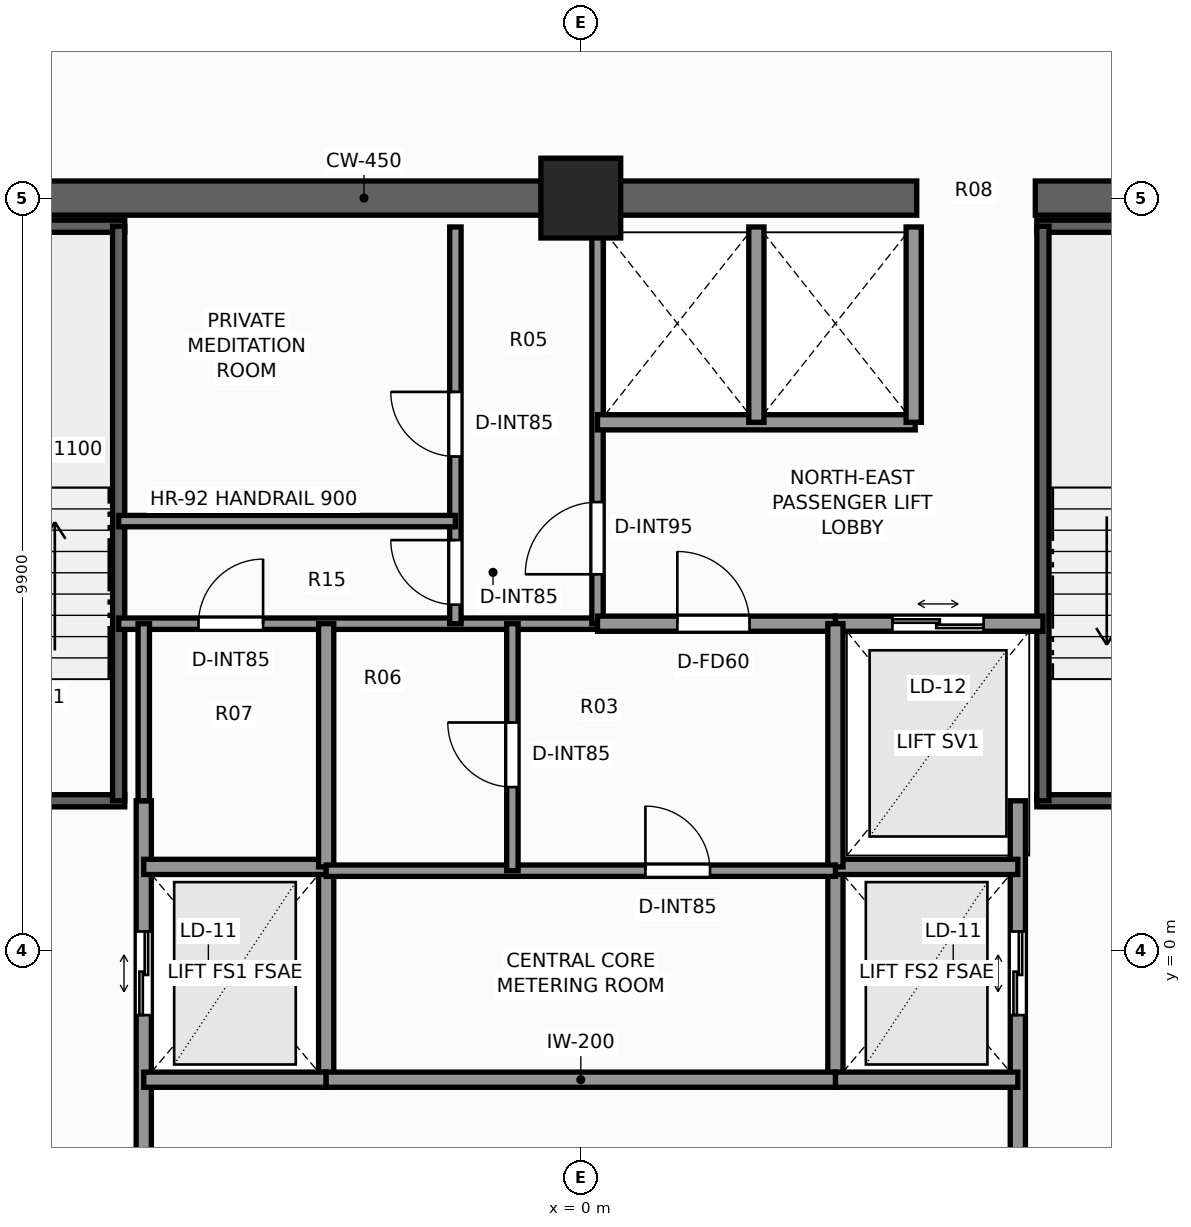
"""IFC4 building model, lengths in metres.
Left out: names, types, materials, properties, quantities, classifications, styles, units other than length and angle.
Written with IfcOpenShell. Run it as: python <this file> out.ifc"""

import sys

from ifc_helpers import new_model, si_unit, direction, frame, frame_2d, origin, origin_2d, place, context, subcontext, project, spatial, rectangle, extrude, element, fill, save


model = new_model("IFC4")
c1 = context("Model", 3, precision=1e-05, world=origin(), true_north=direction((0.0, 1.0)))
c2 = subcontext(c1, "Body", "Model", "MODEL_VIEW")
j1 = project(units=[si_unit("LENGTHUNIT", "METRE"), si_unit("PLANEANGLEUNIT", "RADIAN")], contexts=[c1])
p1 = place(None, origin())
s1 = spatial("IfcSite", under=j1, at=p1, CompositionType="ELEMENT")
p2 = place(p1, origin())
s2 = spatial("IfcBuilding", under=s1, at=p2, CompositionType="ELEMENT")
p3 = place(p2, frame((0.0, 0.0, 209.7)))
s3 = spatial("IfcBuildingStorey", under=s2, at=p3, CompositionType="ELEMENT", Elevation=209.7)
p4 = place(p3, frame((-10.125, 9.9, 0.0), z_axis=(0.0, 0.0, 1.0), x_axis=(1.0, 0.0, 0.0)))
e1 = element("IfcWall", 1, at=p4, inside=s3, PredefinedType="SHEAR", context=c2, shape_type="SweptSolid", body=[
    extrude(rectangle(XDim=14.545, YDim=0.45, at=frame_2d((7.272, 0.0))), origin(), (0.0, 0.0, 1.0), 3.3),
])
p5 = place(p3, frame((5.98, 9.9, 0.0), z_axis=(0.0, 0.0, 1.0), x_axis=(1.0, 0.0, 0.0)))
e2 = element("IfcWall", 2, at=p5, inside=s3, PredefinedType="SHEAR", context=c2, shape_type="SweptSolid", body=[
    extrude(rectangle(XDim=4.145, YDim=0.45, at=frame_2d((2.073, 0.0))), origin(), (0.0, 0.0, 1.0), 3.3),
])
p6 = place(p3, frame((0.0, 9.9, 0.0), z_axis=(0.0, 0.0, 1.0), x_axis=(1.0, 0.0, 0.0)))
e3 = element("IfcColumn", 3, at=p6, inside=s3, PredefinedType="COLUMN", context=c2, shape_type="SweptSolid", body=[
    extrude(rectangle(XDim=1.05, YDim=1.05, at=origin_2d()), origin(), (0.0, 0.0, 1.0), 3.3),
])
p7 = place(p3, frame((-9.52, 1.97, 0.0), z_axis=(0.0, 0.0, 1.0), x_axis=(1.0, 0.0, 0.0)))
e4 = element("IfcWall", 4, at=p7, inside=s3, PredefinedType="SHEAR", context=c2, shape_type="SweptSolid", body=[
    extrude(rectangle(XDim=3.52, YDim=0.16, at=frame_2d((1.76, 0.0))), origin(), (0.0, 0.0, 1.0), 3.3),
])
p8 = place(p7, frame((1.15, 0.0, 0.0)))
e5 = element("IfcOpeningElement", 5, at=p8, cuts=e4, PredefinedType="OPENING", context=c2, shape_type="SweptSolid", body=[
    extrude(rectangle(XDim=1.1, YDim=2.2, at=frame_2d((0.55, 1.1))), frame((0.0, 0.09, 0.0), z_axis=(0.0, -1.0, 0.0), x_axis=(1.0, 0.0, 0.0)), (0.0, 0.0, 1.0), 0.18),
])
p9 = place(p3, frame((-9.52, 9.53, 0.0), z_axis=(0.0, 0.0, 1.0), x_axis=(1.0, 0.0, 0.0)))
e6 = element("IfcWall", 6, at=p9, inside=s3, PredefinedType="SHEAR", context=c2, shape_type="SweptSolid", body=[
    extrude(rectangle(XDim=3.52, YDim=0.16, at=frame_2d((1.76, 0.0))), origin(), (0.0, 0.0, 1.0), 3.3),
])
p10 = place(p3, frame((-6.08, 1.97, 0.0), z_axis=(0.0, 0.0, 1.0), x_axis=(0.0, 1.0, 0.0)))
e7 = element("IfcWall", 7, at=p10, inside=s3, PredefinedType="SHEAR", context=c2, shape_type="SweptSolid", body=[
    extrude(rectangle(XDim=7.56, YDim=0.16, at=frame_2d((3.78, 0.0))), origin(), (0.0, 0.0, 1.0), 3.3),
])
p11 = place(p3, frame((6.0, 1.97, 0.0), z_axis=(0.0, 0.0, 1.0), x_axis=(1.0, 0.0, 0.0)))
e8 = element("IfcWall", 8, at=p11, inside=s3, PredefinedType="SHEAR", context=c2, shape_type="SweptSolid", body=[
    extrude(rectangle(XDim=3.52, YDim=0.16, at=frame_2d((1.76, 0.0))), origin(), (0.0, 0.0, 1.0), 3.3),
])
p12 = place(p11, frame((1.15, 0.0, 0.0)))
e9 = element("IfcOpeningElement", 9, at=p12, cuts=e8, PredefinedType="OPENING", context=c2, shape_type="SweptSolid", body=[
    extrude(rectangle(XDim=1.1, YDim=2.2, at=frame_2d((0.55, 1.1))), frame((0.0, 0.09, 0.0), z_axis=(0.0, -1.0, 0.0), x_axis=(1.0, 0.0, 0.0)), (0.0, 0.0, 1.0), 0.18),
])
p13 = place(p3, frame((6.0, 9.53, 0.0), z_axis=(0.0, 0.0, 1.0), x_axis=(1.0, 0.0, 0.0)))
e10 = element("IfcWall", 10, at=p13, inside=s3, PredefinedType="SHEAR", context=c2, shape_type="SweptSolid", body=[
    extrude(rectangle(XDim=3.52, YDim=0.16, at=frame_2d((1.76, 0.0))), origin(), (0.0, 0.0, 1.0), 3.3),
])
p14 = place(p3, frame((6.08, 1.97, 0.0), z_axis=(0.0, 0.0, 1.0), x_axis=(0.0, 1.0, 0.0)))
e11 = element("IfcWall", 11, at=p14, inside=s3, PredefinedType="SHEAR", context=c2, shape_type="SweptSolid", body=[
    extrude(rectangle(XDim=7.56, YDim=0.16, at=frame_2d((3.78, 0.0))), origin(), (0.0, 0.0, 1.0), 3.3),
])
p15 = place(p3, frame((-5.75, -3.6, 0.0), z_axis=(0.0, 0.0, 1.0), x_axis=(0.0, 1.0, 0.0)))
e12 = element("IfcWall", 12, at=p15, inside=s3, PredefinedType="SOLIDWALL", context=c2, shape_type="SweptSolid", body=[
    extrude(rectangle(XDim=5.57, YDim=0.2, at=frame_2d((2.785, 0.0))), origin(), (0.0, 0.0, 1.0), 3.08),
])
p16 = place(p15, frame((2.75, 0.0, 0.0)))
e13 = element("IfcOpeningElement", 13, at=p16, cuts=e12, PredefinedType="OPENING", context=c2, shape_type="SweptSolid", body=[
    extrude(rectangle(XDim=1.1, YDim=2.2, at=frame_2d((0.55, 1.1))), frame((0.0, 0.11, 0.0), z_axis=(0.0, -1.0, 0.0), x_axis=(1.0, 0.0, 0.0)), (0.0, 0.0, 1.0), 0.22),
])
p17 = place(p3, frame((-3.35, -1.7, 0.0), z_axis=(0.0, 0.0, 1.0), x_axis=(0.0, 1.0, 0.0)))
e14 = element("IfcWall", 14, at=p17, inside=s3, PredefinedType="SOLIDWALL", context=c2, shape_type="SweptSolid", body=[
    extrude(rectangle(XDim=2.8, YDim=0.2, at=frame_2d((1.4, 0.0))), origin(), (0.0, 0.0, 1.0), 3.08),
])
for number, where, z_axis, x_axis in (
    (15, (-5.75, -1.7, 0.0), (0.0, 0.0, 1.0), (1.0, 0.0, 0.0)),
    (16, (-5.75, 1.1, 0.0), (0.0, 0.0, 1.0), (1.0, 0.0, 0.0)),
):
    element("IfcWall", number, at=place(p3, frame(where, z_axis=z_axis, x_axis=x_axis)), inside=s3, PredefinedType="SOLIDWALL", context=c2, shape_type="SweptSolid", body=[
        extrude(rectangle(XDim=2.4, YDim=0.2, at=frame_2d((1.2, 0.0))), origin(), (0.0, 0.0, 1.0), 3.08),
    ])
p18 = place(p3, frame((5.75, -3.6, 0.0), z_axis=(0.0, 0.0, 1.0), x_axis=(0.0, 1.0, 0.0)))
e17 = element("IfcWall", 17, at=p18, inside=s3, PredefinedType="SOLIDWALL", context=c2, shape_type="SweptSolid", body=[
    extrude(rectangle(XDim=5.57, YDim=0.2, at=frame_2d((2.785, 0.0))), origin(), (0.0, 0.0, 1.0), 3.08),
])
p19 = place(p18, frame((2.75, 0.0, 0.0)))
e18 = element("IfcOpeningElement", 18, at=p19, cuts=e17, PredefinedType="OPENING", context=c2, shape_type="SweptSolid", body=[
    extrude(rectangle(XDim=1.1, YDim=2.2, at=frame_2d((0.55, 1.1))), frame((0.0, 0.11, 0.0), z_axis=(0.0, -1.0, 0.0), x_axis=(1.0, 0.0, 0.0)), (0.0, 0.0, 1.0), 0.22),
])
p20 = place(p3, frame((3.35, -1.7, 0.0), z_axis=(0.0, 0.0, 1.0), x_axis=(0.0, 1.0, 0.0)))
e19 = element("IfcWall", 19, at=p20, inside=s3, PredefinedType="SOLIDWALL", context=c2, shape_type="SweptSolid", body=[
    extrude(rectangle(XDim=2.8, YDim=0.2, at=frame_2d((1.4, 0.0))), origin(), (0.0, 0.0, 1.0), 3.08),
])
for number, where, z_axis, x_axis in (
    (20, (3.35, -1.7, 0.0), (0.0, 0.0, 1.0), (1.0, 0.0, 0.0)),
    (21, (3.35, 1.1, 0.0), (0.0, 0.0, 1.0), (1.0, 0.0, 0.0)),
):
    element("IfcWall", number, at=place(p3, frame(where, z_axis=z_axis, x_axis=x_axis)), inside=s3, PredefinedType="SOLIDWALL", context=c2, shape_type="SweptSolid", body=[
        extrude(rectangle(XDim=2.4, YDim=0.2, at=frame_2d((1.2, 0.0))), origin(), (0.0, 0.0, 1.0), 3.08),
    ])
p21 = place(p3, frame((3.35, 4.3, 0.0), z_axis=(0.0, 0.0, 1.0), x_axis=(1.0, 0.0, 0.0)))
e22 = element("IfcWall", 22, at=p21, inside=s3, PredefinedType="SOLIDWALL", context=c2, shape_type="SweptSolid", body=[
    extrude(rectangle(XDim=2.73, YDim=0.2, at=frame_2d((1.365, 0.0))), origin(), (0.0, 0.0, 1.0), 3.08),
])
p22 = place(p21, frame((0.75, 0.0, 0.0)))
e23 = element("IfcOpeningElement", 23, at=p22, cuts=e22, PredefinedType="OPENING", context=c2, shape_type="SweptSolid", body=[
    extrude(rectangle(XDim=1.2, YDim=2.25, at=frame_2d((0.6, 1.125))), frame((0.0, 0.11, 0.0), z_axis=(0.0, -1.0, 0.0), x_axis=(1.0, 0.0, 0.0)), (0.0, 0.0, 1.0), 0.22),
])
p23 = place(p3, frame((-6.08, 4.3, 0.0), z_axis=(0.0, 0.0, 1.0), x_axis=(1.0, 0.0, 0.0)))
e24 = element("IfcWall", 24, at=p23, inside=s3, PredefinedType="PARTITIONING", context=c2, shape_type="SweptSolid", body=[
    extrude(rectangle(XDim=6.3, YDim=0.15, at=frame_2d((3.15, 0.0))), origin(), (0.0, 0.0, 1.0), 3.08),
])
p24 = place(p23, frame((1.05, 0.0, 0.0)))
e25 = element("IfcOpeningElement", 25, at=p24, cuts=e24, PredefinedType="OPENING", context=c2, shape_type="SweptSolid", body=[
    extrude(rectangle(XDim=0.85, YDim=2.03, at=frame_2d((0.425, 1.015))), frame((0.0, 0.085, 0.0), z_axis=(0.0, -1.0, 0.0), x_axis=(1.0, 0.0, 0.0)), (0.0, 0.0, 1.0), 0.17),
])
p25 = place(p3, frame((0.22, 4.3, 0.0), z_axis=(0.0, 0.0, 1.0), x_axis=(0.0, 1.0, 0.0)))
e26 = element("IfcWall", 26, at=p25, inside=s3, PredefinedType="PARTITIONING", context=c2, shape_type="SweptSolid", body=[
    extrude(rectangle(XDim=5.22, YDim=0.15, at=frame_2d((2.61, 0.0))), origin(), (0.0, 0.0, 1.0), 3.08),
])
p26 = place(p25, frame((0.65, 0.0, 0.0)))
e27 = element("IfcOpeningElement", 27, at=p26, cuts=e26, PredefinedType="OPENING", context=c2, shape_type="SweptSolid", body=[
    extrude(rectangle(XDim=0.95, YDim=2.06, at=frame_2d((0.475, 1.03))), frame((0.0, 0.085, 0.0), z_axis=(0.0, -1.0, 0.0), x_axis=(1.0, 0.0, 0.0)), (0.0, 0.0, 1.0), 0.17),
])
p27 = place(p3, frame((-1.65, 4.3, 0.0), z_axis=(0.0, 0.0, 1.0), x_axis=(0.0, 1.0, 0.0)))
e28 = element("IfcWall", 28, at=p27, inside=s3, PredefinedType="PARTITIONING", context=c2, shape_type="SweptSolid", body=[
    extrude(rectangle(XDim=5.22, YDim=0.15, at=frame_2d((2.61, 0.0))), origin(), (0.0, 0.0, 1.0), 3.08),
])
p28 = place(p27, frame((2.2, 0.0, 0.0)))
e29 = element("IfcOpeningElement", 29, at=p28, cuts=e28, PredefinedType="OPENING", context=c2, shape_type="SweptSolid", body=[
    extrude(rectangle(XDim=0.85, YDim=2.03, at=frame_2d((0.425, 1.015))), frame((0.0, 0.085, 0.0), z_axis=(0.0, -1.0, 0.0), x_axis=(1.0, 0.0, 0.0)), (0.0, 0.0, 1.0), 0.17),
])
p29 = place(p27, frame((0.25, 0.0, 0.0)))
e30 = element("IfcOpeningElement", 30, at=p29, cuts=e28, PredefinedType="OPENING", context=c2, shape_type="SweptSolid", body=[
    extrude(rectangle(XDim=0.85, YDim=2.03, at=frame_2d((0.425, 1.015))), frame((0.0, 0.085, 0.0), z_axis=(0.0, -1.0, 0.0), x_axis=(1.0, 0.0, 0.0)), (0.0, 0.0, 1.0), 0.17),
])
p30 = place(p3, frame((-6.08, 5.65, 0.0), z_axis=(0.0, 0.0, 1.0), x_axis=(1.0, 0.0, 0.0)))
e31 = element("IfcWall", 31, at=p30, inside=s3, PredefinedType="PARTITIONING", context=c2, shape_type="SweptSolid", body=[
    extrude(rectangle(XDim=4.43, YDim=0.15, at=frame_2d((2.215, 0.0))), origin(), (0.0, 0.0, 1.0), 3.08),
])
p31 = place(p3, frame((0.22, 6.95, 0.0), z_axis=(0.0, 0.0, 1.0), x_axis=(1.0, 0.0, 0.0)))
e32 = element("IfcWall", 32, at=p31, inside=s3, PredefinedType="SOLIDWALL", context=c2, shape_type="SweptSolid", body=[
    extrude(rectangle(XDim=4.18, YDim=0.2, at=frame_2d((2.09, 0.0))), origin(), (0.0, 0.0, 1.0), 3.08),
])
for number, where, z_axis, x_axis in (
    (33, (4.38, 6.95, 0.0), (0.0, 0.0, 1.0), (0.0, 1.0, 0.0)),
    (34, (2.31, 6.95, 0.0), (0.0, 0.0, 1.0), (0.0, 1.0, 0.0)),
):
    element("IfcWall", number, at=place(p3, frame(where, z_axis=z_axis, x_axis=x_axis)), inside=s3, PredefinedType="SOLIDWALL", context=c2, shape_type="SweptSolid", body=[
        extrude(rectangle(XDim=2.57, YDim=0.2, at=frame_2d((1.285, 0.0))), origin(), (0.0, 0.0, 1.0), 3.08),
    ])
p32 = place(p3, frame((0.22, 4.3, 0.0), z_axis=(0.0, 0.0, 1.0), x_axis=(1.0, 0.0, 0.0)))
e35 = element("IfcWall", 35, at=p32, inside=s3, PredefinedType="SOLIDWALL", context=c2, shape_type="SweptSolid", body=[
    extrude(rectangle(XDim=3.13, YDim=0.2, at=frame_2d((1.565, 0.0))), origin(), (0.0, 0.0, 1.0), 3.08),
])
p33 = place(p32, frame((1.05, 0.0, 0.0)))
e36 = element("IfcOpeningElement", 36, at=p33, cuts=e35, PredefinedType="OPENING", context=c2, shape_type="SweptSolid", body=[
    extrude(rectangle(XDim=0.95, YDim=2.06, at=frame_2d((0.475, 1.03))), frame((0.0, 0.11, 0.0), z_axis=(0.0, -1.0, 0.0), x_axis=(1.0, 0.0, 0.0)), (0.0, 0.0, 1.0), 0.22),
])
p34 = place(p3, frame((-3.35, -1.7, 0.0), z_axis=(0.0, 0.0, 1.0), x_axis=(1.0, 0.0, 0.0)))
e37 = element("IfcWall", 37, at=p34, inside=s3, PredefinedType="SOLIDWALL", context=c2, shape_type="SweptSolid", body=[
    extrude(rectangle(XDim=6.7, YDim=0.2, at=frame_2d((3.35, 0.0))), origin(), (0.0, 0.0, 1.0), 3.08),
])
for number, where, z_axis, x_axis in (
    (38, (-3.35, 1.1, 0.0), (0.0, 0.0, 1.0), (0.0, 1.0, 0.0)),
    (39, (3.35, 1.1, 0.0), (0.0, 0.0, 1.0), (0.0, 1.0, 0.0)),
):
    element("IfcWall", number, at=place(p3, frame(where, z_axis=z_axis, x_axis=x_axis)), inside=s3, PredefinedType="SOLIDWALL", context=c2, shape_type="SweptSolid", body=[
        extrude(rectangle(XDim=3.2, YDim=0.2, at=frame_2d((1.6, 0.0))), origin(), (0.0, 0.0, 1.0), 3.08),
    ])
p35 = place(p3, frame((-3.35, 1.05, 0.0), z_axis=(0.0, 0.0, 1.0), x_axis=(1.0, 0.0, 0.0)))
e40 = element("IfcWall", 40, at=p35, inside=s3, PredefinedType="PARTITIONING", context=c2, shape_type="SweptSolid", body=[
    extrude(rectangle(XDim=6.7, YDim=0.15, at=frame_2d((3.35, 0.0))), origin(), (0.0, 0.0, 1.0), 3.08),
])
p36 = place(p35, frame((4.2, 0.0, 0.0)))
e41 = element("IfcOpeningElement", 41, at=p36, cuts=e40, PredefinedType="OPENING", context=c2, shape_type="SweptSolid", body=[
    extrude(rectangle(XDim=0.85, YDim=2.03, at=frame_2d((0.425, 1.015))), frame((0.0, 0.085, 0.0), z_axis=(0.0, -1.0, 0.0), x_axis=(1.0, 0.0, 0.0)), (0.0, 0.0, 1.0), 0.17),
])
p37 = place(p3, frame((-0.9, 1.05, 0.0), z_axis=(0.0, 0.0, 1.0), x_axis=(0.0, 1.0, 0.0)))
e42 = element("IfcWall", 42, at=p37, inside=s3, PredefinedType="PARTITIONING", context=c2, shape_type="SweptSolid", body=[
    extrude(rectangle(XDim=3.25, YDim=0.15, at=frame_2d((1.625, 0.0))), origin(), (0.0, 0.0, 1.0), 3.08),
])
p38 = place(p37, frame((1.1, 0.0, 0.0)))
e43 = element("IfcOpeningElement", 43, at=p38, cuts=e42, PredefinedType="OPENING", context=c2, shape_type="SweptSolid", body=[
    extrude(rectangle(XDim=0.85, YDim=2.03, at=frame_2d((0.425, 1.015))), frame((0.0, 0.085, 0.0), z_axis=(0.0, -1.0, 0.0), x_axis=(1.0, 0.0, 0.0)), (0.0, 0.0, 1.0), 0.17),
])
p39 = place(p3, frame((-5.75, 1.97, 0.0), z_axis=(0.0, 0.0, 1.0), x_axis=(0.0, 1.0, 0.0)))
e44 = element("IfcWall", 44, at=p39, inside=s3, PredefinedType="PARTITIONING", context=c2, shape_type="SweptSolid", body=[
    extrude(rectangle(XDim=2.33, YDim=0.15, at=frame_2d((1.165, 0.0))), origin(), (0.0, 0.0, 1.0), 3.08),
])
p40 = place(p16, origin())
e45 = element("IfcDoor", 45, at=p40, inside=s3, OperationType="DOUBLE_DOOR_SLIDING", PredefinedType="DOOR", context=c2, shape_type="SweptSolid", body=[
    extrude(rectangle(XDim=1.1, YDim=2.2, at=frame_2d((0.55, 1.1))), frame((0.0, 0.025, 0.0), z_axis=(0.0, -1.0, 0.0), x_axis=(1.0, 0.0, 0.0)), (0.0, 0.0, 1.0), 0.05),
])
fill(e13, e45)
p41 = place(p19, origin())
e46 = element("IfcDoor", 46, at=p41, inside=s3, OperationType="DOUBLE_DOOR_SLIDING", PredefinedType="DOOR", context=c2, shape_type="SweptSolid", body=[
    extrude(rectangle(XDim=1.1, YDim=2.2, at=frame_2d((0.55, 1.1))), frame((0.0, 0.025, 0.0), z_axis=(0.0, -1.0, 0.0), x_axis=(1.0, 0.0, 0.0)), (0.0, 0.0, 1.0), 0.05),
])
fill(e18, e46)
p42 = place(p22, origin())
e47 = element("IfcDoor", 47, at=p42, inside=s3, OperationType="DOUBLE_DOOR_SLIDING", PredefinedType="DOOR", context=c2, shape_type="SweptSolid", body=[
    extrude(rectangle(XDim=1.2, YDim=2.25, at=frame_2d((0.6, 1.125))), frame((0.0, 0.025, 0.0), z_axis=(0.0, -1.0, 0.0), x_axis=(1.0, 0.0, 0.0)), (0.0, 0.0, 1.0), 0.05),
])
fill(e23, e47)
p43 = place(p26, origin())
e48 = element("IfcDoor", 48, at=p43, inside=s3, OperationType="SINGLE_SWING_LEFT", PredefinedType="DOOR", context=c2, shape_type="SweptSolid", body=[
    extrude(rectangle(XDim=0.95, YDim=2.06, at=frame_2d((0.475, 1.03))), frame((0.0, 0.025, 0.0), z_axis=(0.0, -1.0, 0.0), x_axis=(1.0, 0.0, 0.0)), (0.0, 0.0, 1.0), 0.05),
])
fill(e27, e48)
p44 = place(p28, origin())
e49 = element("IfcDoor", 49, at=p44, inside=s3, OperationType="SINGLE_SWING_RIGHT", PredefinedType="DOOR", context=c2, shape_type="SweptSolid", body=[
    extrude(rectangle(XDim=0.85, YDim=2.03, at=frame_2d((0.425, 1.015))), frame((0.0, 0.025, 0.0), z_axis=(0.0, -1.0, 0.0), x_axis=(1.0, 0.0, 0.0)), (0.0, 0.0, 1.0), 0.05),
])
fill(e29, e49)
p45 = place(p29, origin())
e50 = element("IfcDoor", 50, at=p45, inside=s3, OperationType="SINGLE_SWING_RIGHT", PredefinedType="DOOR", context=c2, shape_type="SweptSolid", body=[
    extrude(rectangle(XDim=0.85, YDim=2.03, at=frame_2d((0.425, 1.015))), frame((0.0, 0.025, 0.0), z_axis=(0.0, -1.0, 0.0), x_axis=(1.0, 0.0, 0.0)), (0.0, 0.0, 1.0), 0.05),
])
fill(e30, e50)
p46 = place(p33, origin())
e51 = element("IfcDoor", 51, at=p46, inside=s3, OperationType="SINGLE_SWING_LEFT", PredefinedType="DOOR", context=c2, shape_type="SweptSolid", body=[
    extrude(rectangle(XDim=0.95, YDim=2.06, at=frame_2d((0.475, 1.03))), frame((0.0, 0.025, 0.0), z_axis=(0.0, -1.0, 0.0), x_axis=(1.0, 0.0, 0.0)), (0.0, 0.0, 1.0), 0.05),
])
fill(e36, e51)
p47 = place(p36, origin())
e52 = element("IfcDoor", 52, at=p47, inside=s3, OperationType="SINGLE_SWING_LEFT", PredefinedType="DOOR", context=c2, shape_type="SweptSolid", body=[
    extrude(rectangle(XDim=0.85, YDim=2.03, at=frame_2d((0.425, 1.015))), frame((0.0, 0.025, 0.0), z_axis=(0.0, -1.0, 0.0), x_axis=(1.0, 0.0, 0.0)), (0.0, 0.0, 1.0), 0.05),
])
fill(e41, e52)
p48 = place(p38, origin())
e53 = element("IfcDoor", 53, at=p48, inside=s3, OperationType="SINGLE_SWING_RIGHT", PredefinedType="DOOR", context=c2, shape_type="SweptSolid", body=[
    extrude(rectangle(XDim=0.85, YDim=2.03, at=frame_2d((0.425, 1.015))), frame((0.0, 0.025, 0.0), z_axis=(0.0, -1.0, 0.0), x_axis=(1.0, 0.0, 0.0)), (0.0, 0.0, 1.0), 0.05),
])
fill(e43, e53)
p49 = place(p24, origin())
e54 = element("IfcDoor", 54, at=p49, inside=s3, OperationType="SINGLE_SWING_RIGHT", PredefinedType="DOOR", context=c2, shape_type="SweptSolid", body=[
    extrude(rectangle(XDim=0.85, YDim=2.03, at=frame_2d((0.425, 1.015))), frame((0.0, 0.025, 0.0), z_axis=(0.0, -1.0, 0.0), x_axis=(1.0, 0.0, 0.0)), (0.0, 0.0, 1.0), 0.05),
])
fill(e25, e54)
save(model, sys.argv[1])
